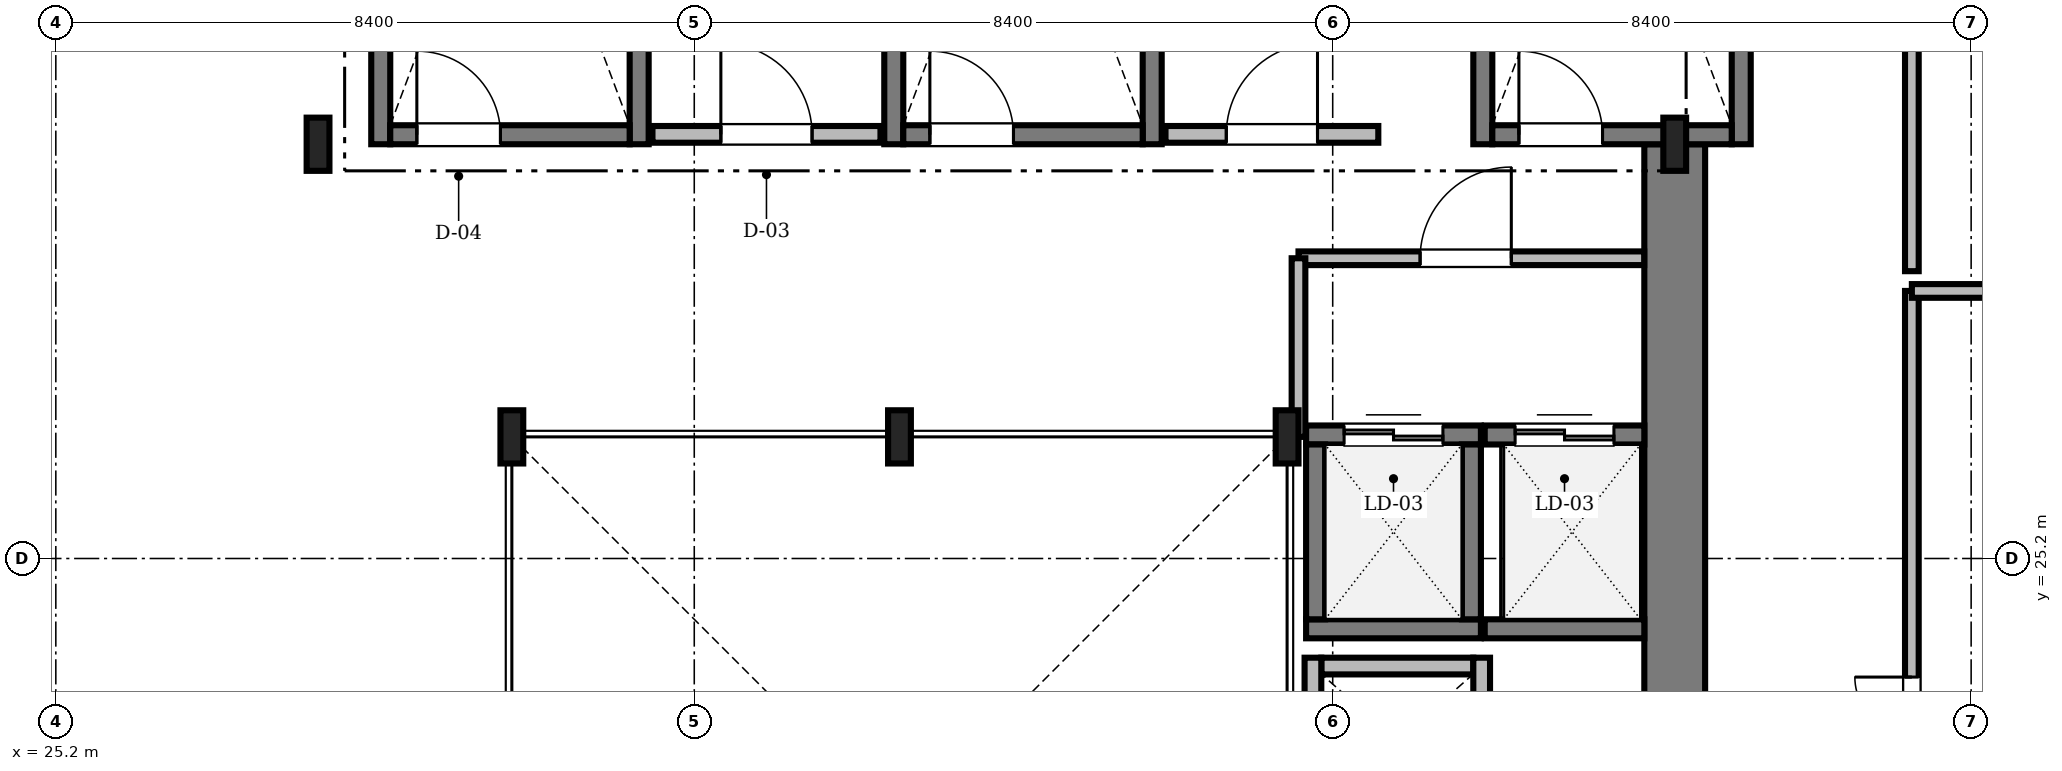
"""IFC4 building model, lengths in metres.
Left out: names, types, materials, properties, quantities, classifications, styles, units other than length and angle.
Written with IfcOpenShell. Run it as: python <this file> out.ifc"""

import sys

from ifc_helpers import new_model, si_unit, direction, frame, frame_2d, origin, origin_2d, place, context, subcontext, project, spatial, rectangle, i_section, extrude, source, transform, mapped, element, fill, save


model = new_model("IFC4")
c1 = context("Model", 3, precision=1e-05, world=origin(), true_north=direction((0.0, 1.0)))
c2 = subcontext(c1, "Body", "Model", "MODEL_VIEW")
j1 = project(units=[si_unit("LENGTHUNIT", "METRE"), si_unit("PLANEANGLEUNIT", "RADIAN")], contexts=[c1])
p1 = place(None, origin())
s1 = spatial("IfcSite", under=j1, at=p1, CompositionType="ELEMENT")
p2 = place(p1, origin())
s2 = spatial("IfcBuilding", under=s1, at=p2, CompositionType="ELEMENT")
p3 = place(p2, frame((0.0, 0.0, 237.3)))
s3 = spatial("IfcBuildingStorey", under=s2, at=p3, CompositionType="ELEMENT", Elevation=237.3)
m1 = source(origin(), c2, "Body", "SweptSolid", [
    extrude(rectangle(XDim=13.15, YDim=0.8, at=frame_2d((6.575, 0.0))), origin(), (0.0, 0.0, 1.0), 4.75),
])
p4 = place(p3, frame((46.5, 17.5, 0.0), z_axis=(0.0, 0.0, 1.0), x_axis=(0.0, 1.0, 0.0)))
e1 = element("IfcWall", 1, at=p4, inside=s3, PredefinedType="SHEAR", context=c2, shape_type="MappedRepresentation", body=[
    mapped(m1, transform((0.0, 0.0, 0.0), scale=1.0)),
])
m2 = source(origin(), c2, "Body", "SweptSolid", [
    extrude(i_section(OverallWidth=0.3, OverallDepth=0.7, WebThickness=0.017, FlangeThickness=0.032, FilletRadius=0.027, at=origin_2d()), origin(), (0.0, 0.0, 1.0), 4.75),
])
for number, where, z_axis, x_axis in (
    (2, (41.4, 26.8, 0.0), (0.0, 0.0, 1.0), (1.0, 0.0, 0.0)),
    (3, (36.3, 26.8, 0.0), (0.0, 0.0, 1.0), (1.0, 0.0, 0.0)),
    (4, (31.2, 26.8, 0.0), (0.0, 0.0, 1.0), (1.0, 0.0, 0.0)),
    (5, (28.65, 30.65, 0.0), (0.0, 0.0, 1.0), (1.0, 0.0, 0.0)),
    (6, (46.5, 30.65, 0.0), (0.0, 0.0, 1.0), (1.0, 0.0, 0.0)),
):
    element("IfcColumn", number, at=place(p3, frame(where, z_axis=z_axis, x_axis=x_axis)), inside=s3, PredefinedType="COLUMN", context=c2, shape_type="MappedRepresentation", body=[
        mapped(m2, transform((0.0, 0.0, 0.0), scale=1.0)),
    ])
m3 = source(origin(), c2, "Body", "SweptSolid", [
    extrude(rectangle(XDim=9.25, YDim=0.25, at=frame_2d((4.625, 0.0))), origin(), (0.0, 0.0, 1.0), 5.2),
])
for number, where, z_axis, x_axis in (
    (7, (29.475, 30.65, 0.0), (0.0, 0.0, 1.0), (0.0, 1.0, 0.0)),
    (8, (32.875, 30.65, 0.0), (0.0, 0.0, 1.0), (0.0, 1.0, 0.0)),
):
    element("IfcWall", number, at=place(p3, frame(where, z_axis=z_axis, x_axis=x_axis)), inside=s3, PredefinedType="SOLIDWALL", context=c2, shape_type="MappedRepresentation", body=[
        mapped(m3, transform((0.0, 0.0, 0.0), scale=1.0)),
    ])
m4 = source(origin(), c2, "Body", "SweptSolid", [
    extrude(rectangle(XDim=3.15, YDim=0.25, at=frame_2d((1.575, 0.0))), origin(), (0.0, 0.0, 1.0), 5.2),
])
p5 = place(p3, frame((29.6, 30.775, 0.0), z_axis=(0.0, 0.0, 1.0), x_axis=(1.0, 0.0, 0.0)))
e9 = element("IfcWall", 9, at=p5, inside=s3, PredefinedType="SOLIDWALL", context=c2, shape_type="MappedRepresentation", body=[
    mapped(m4, transform((0.0, 0.0, 0.0), scale=1.0)),
])
m5 = source(origin(), c2, "Body", "SweptSolid", [
    extrude(rectangle(XDim=1.1, YDim=2.2, at=frame_2d((0.55, 1.1))), frame((0.0, 0.135, 0.0), z_axis=(0.0, -1.0, 0.0), x_axis=(1.0, 0.0, 0.0)), (0.0, 0.0, 1.0), 0.27),
])
p6 = place(p5, frame((0.35, 0.0, 0.0)))
e10 = element("IfcOpeningElement", 10, at=p6, cuts=e9, PredefinedType="OPENING", context=c2, shape_type="MappedRepresentation", body=[
    mapped(m5, transform((0.0, 0.0, 0.0), scale=1.0)),
])
for number, where, z_axis, x_axis in (
    (11, (36.225, 30.65, 0.0), (0.0, 0.0, 1.0), (0.0, 1.0, 0.0)),
    (12, (39.625, 30.65, 0.0), (0.0, 0.0, 1.0), (0.0, 1.0, 0.0)),
):
    element("IfcWall", number, at=place(p3, frame(where, z_axis=z_axis, x_axis=x_axis)), inside=s3, PredefinedType="SOLIDWALL", context=c2, shape_type="MappedRepresentation", body=[
        mapped(m3, transform((0.0, 0.0, 0.0), scale=1.0)),
    ])
p7 = place(p3, frame((36.35, 30.775, 0.0), z_axis=(0.0, 0.0, 1.0), x_axis=(1.0, 0.0, 0.0)))
e13 = element("IfcWall", 13, at=p7, inside=s3, PredefinedType="SOLIDWALL", context=c2, shape_type="MappedRepresentation", body=[
    mapped(m4, transform((0.0, 0.0, 0.0), scale=1.0)),
])
p8 = place(p7, frame((0.35, 0.0, 0.0)))
e14 = element("IfcOpeningElement", 14, at=p8, cuts=e13, PredefinedType="OPENING", context=c2, shape_type="MappedRepresentation", body=[
    mapped(m5, transform((0.0, 0.0, 0.0), scale=1.0)),
])
for number, where, z_axis, x_axis in (
    (15, (43.975, 30.65, 0.0), (0.0, 0.0, 1.0), (0.0, 1.0, 0.0)),
    (16, (47.375, 30.65, 0.0), (0.0, 0.0, 1.0), (0.0, 1.0, 0.0)),
):
    element("IfcWall", number, at=place(p3, frame(where, z_axis=z_axis, x_axis=x_axis)), inside=s3, PredefinedType="SOLIDWALL", context=c2, shape_type="MappedRepresentation", body=[
        mapped(m3, transform((0.0, 0.0, 0.0), scale=1.0)),
    ])
p9 = place(p3, frame((44.1, 30.775, 0.0), z_axis=(0.0, 0.0, 1.0), x_axis=(1.0, 0.0, 0.0)))
e17 = element("IfcWall", 17, at=p9, inside=s3, PredefinedType="SOLIDWALL", context=c2, shape_type="MappedRepresentation", body=[
    mapped(m4, transform((0.0, 0.0, 0.0), scale=1.0)),
])
p10 = place(p9, frame((0.35, 0.0, 0.0)))
e18 = element("IfcOpeningElement", 18, at=p10, cuts=e17, PredefinedType="OPENING", context=c2, shape_type="MappedRepresentation", body=[
    mapped(m5, transform((0.0, 0.0, 0.0), scale=1.0)),
])
m6 = source(origin(), c2, "Body", "SweptSolid", [
    extrude(rectangle(XDim=3.0, YDim=0.22, at=frame_2d((1.5, 0.0))), origin(), (0.0, 0.0, 1.0), 4.75),
])
p11 = place(p3, frame((33.05, 30.78, 0.0), z_axis=(0.0, 0.0, 1.0), x_axis=(1.0, 0.0, 0.0)))
e19 = element("IfcWall", 19, at=p11, inside=s3, PredefinedType="SOLIDWALL", context=c2, shape_type="MappedRepresentation", body=[
    mapped(m6, transform((0.0, 0.0, 0.0), scale=1.0)),
])
m7 = source(origin(), c2, "Body", "SweptSolid", [
    extrude(rectangle(XDim=1.2, YDim=2.2, at=frame_2d((0.6, 1.1))), frame((0.0, 0.12, 0.0), z_axis=(0.0, -1.0, 0.0), x_axis=(1.0, 0.0, 0.0)), (0.0, 0.0, 1.0), 0.24),
])
p12 = place(p11, frame((0.9, 0.0, 0.0)))
e20 = element("IfcOpeningElement", 20, at=p12, cuts=e19, PredefinedType="OPENING", context=c2, shape_type="MappedRepresentation", body=[
    mapped(m7, transform((0.0, 0.0, 0.0), scale=1.0)),
])
m8 = source(origin(), c2, "Body", "SweptSolid", [
    extrude(rectangle(XDim=2.8, YDim=0.22, at=frame_2d((1.4, 0.0))), origin(), (0.0, 0.0, 1.0), 4.75),
])
p13 = place(p3, frame((39.8, 30.78, 0.0), z_axis=(0.0, 0.0, 1.0), x_axis=(1.0, 0.0, 0.0)))
e21 = element("IfcWall", 21, at=p13, inside=s3, PredefinedType="SOLIDWALL", context=c2, shape_type="MappedRepresentation", body=[
    mapped(m8, transform((0.0, 0.0, 0.0), scale=1.0)),
])
p14 = place(p13, frame((0.8, 0.0, 0.0)))
e22 = element("IfcOpeningElement", 22, at=p14, cuts=e21, PredefinedType="OPENING", context=c2, shape_type="MappedRepresentation", body=[
    mapped(m7, transform((0.0, 0.0, 0.0), scale=1.0)),
])
m9 = source(origin(), c2, "Body", "SweptSolid", [
    extrude(rectangle(XDim=2.0, YDim=0.22, at=frame_2d((1.0, 0.0))), origin(), (0.0, 0.0, 1.0), 4.75),
])
p15 = place(p3, frame((41.85, 23.785, 0.0), z_axis=(0.0, 0.0, 1.0), x_axis=(1.0, 0.0, 0.0)))
e23 = element("IfcWall", 23, at=p15, inside=s3, PredefinedType="SOLIDWALL", context=c2, shape_type="MappedRepresentation", body=[
    mapped(m9, transform((0.0, 0.0, 0.0), scale=1.0)),
])
m10 = source(origin(), c2, "Body", "SweptSolid", [
    extrude(rectangle(XDim=2.19, YDim=0.22, at=frame_2d((1.095, 0.0))), origin(), (0.0, 0.0, 1.0), 4.75),
])
for number, where, z_axis, x_axis in (
    (24, (41.74, 21.705, 0.0), (0.0, 0.0, 1.0), (0.0, 1.0, 0.0)),
    (25, (43.96, 21.705, 0.0), (0.0, 0.0, 1.0), (0.0, 1.0, 0.0)),
):
    element("IfcWall", number, at=place(p3, frame(where, z_axis=z_axis, x_axis=x_axis)), inside=s3, PredefinedType="SOLIDWALL", context=c2, shape_type="MappedRepresentation", body=[
        mapped(m10, transform((0.0, 0.0, 0.0), scale=1.0)),
    ])
m11 = source(origin(), c2, "Body", "SweptSolid", [
    extrude(rectangle(XDim=2.3, YDim=0.25, at=frame_2d((1.15, 0.0))), origin(), (0.0, 0.0, 1.0), 4.75),
])
p16 = place(p3, frame((41.65, 24.275, 0.0), z_axis=(0.0, 0.0, 1.0), x_axis=(1.0, 0.0, 0.0)))
e26 = element("IfcWall", 26, at=p16, inside=s3, PredefinedType="SOLIDWALL", context=c2, shape_type="MappedRepresentation", body=[
    mapped(m11, transform((0.0, 0.0, 0.0), scale=1.0)),
])
p17 = place(p3, frame((41.65, 26.825, 0.0), z_axis=(0.0, 0.0, 1.0), x_axis=(1.0, 0.0, 0.0)))
e27 = element("IfcWall", 27, at=p17, inside=s3, PredefinedType="SOLIDWALL", context=c2, shape_type="MappedRepresentation", body=[
    mapped(m11, transform((0.0, 0.0, 0.0), scale=1.0)),
])
m12 = source(origin(), c2, "Body", "SweptSolid", [
    extrude(rectangle(XDim=1.3, YDim=2.3, at=frame_2d((0.65, 1.15))), frame((0.0, 0.135, 0.0), z_axis=(0.0, -1.0, 0.0), x_axis=(1.0, 0.0, 0.0)), (0.0, 0.0, 1.0), 0.27),
])
p18 = place(p17, frame((0.5, 0.0, 0.0)))
e28 = element("IfcOpeningElement", 28, at=p18, cuts=e27, PredefinedType="OPENING", context=c2, shape_type="MappedRepresentation", body=[
    mapped(m12, transform((0.0, 0.0, 0.0), scale=1.0)),
])
for number, where, z_axis, x_axis in (
    (29, (41.775, 24.4, 0.0), (0.0, 0.0, 1.0), (0.0, 1.0, 0.0)),
    (30, (43.825, 24.4, 0.0), (0.0, 0.0, 1.0), (0.0, 1.0, 0.0)),
):
    element("IfcWall", number, at=place(p3, frame(where, z_axis=z_axis, x_axis=x_axis)), inside=s3, PredefinedType="SOLIDWALL", context=c2, shape_type="MappedRepresentation", body=[
        mapped(m11, transform((0.0, 0.0, 0.0), scale=1.0)),
    ])
m13 = source(origin(), c2, "Body", "SweptSolid", [
    extrude(rectangle(XDim=2.1, YDim=0.25, at=frame_2d((1.05, 0.0))), origin(), (0.0, 0.0, 1.0), 4.75),
])
p19 = place(p3, frame((44.0, 24.275, 0.0), z_axis=(0.0, 0.0, 1.0), x_axis=(1.0, 0.0, 0.0)))
e31 = element("IfcWall", 31, at=p19, inside=s3, PredefinedType="SOLIDWALL", context=c2, shape_type="MappedRepresentation", body=[
    mapped(m13, transform((0.0, 0.0, 0.0), scale=1.0)),
])
p20 = place(p3, frame((44.0, 26.825, 0.0), z_axis=(0.0, 0.0, 1.0), x_axis=(1.0, 0.0, 0.0)))
e32 = element("IfcWall", 32, at=p20, inside=s3, PredefinedType="SOLIDWALL", context=c2, shape_type="MappedRepresentation", body=[
    mapped(m13, transform((0.0, 0.0, 0.0), scale=1.0)),
])
p21 = place(p20, frame((0.4, 0.0, 0.0)))
e33 = element("IfcOpeningElement", 33, at=p21, cuts=e32, PredefinedType="OPENING", context=c2, shape_type="MappedRepresentation", body=[
    mapped(m12, transform((0.0, 0.0, 0.0), scale=1.0)),
])
m14 = source(origin(), c2, "Body", "SweptSolid", [
    extrude(rectangle(XDim=9.88, YDim=0.18, at=frame_2d((4.94, 0.0))), origin(), (0.0, 0.0, 1.0), 4.75),
])
p22 = place(p3, frame((49.62, 28.98, 0.0), z_axis=(0.0, 0.0, 1.0), x_axis=(0.0, 1.0, 0.0)))
e34 = element("IfcWall", 34, at=p22, inside=s3, PredefinedType="PARTITIONING", context=c2, shape_type="MappedRepresentation", body=[
    mapped(m14, transform((0.0, 0.0, 0.0), scale=1.0)),
])
m15 = source(origin(), c2, "Body", "SweptSolid", [
    extrude(rectangle(XDim=1.5, YDim=2.3, at=frame_2d((0.75, 1.15))), frame((0.0, 0.1, 0.0), z_axis=(0.0, -1.0, 0.0), x_axis=(1.0, 0.0, 0.0)), (0.0, 0.0, 1.0), 0.2),
])
p23 = place(p22, frame((3.2, 0.0, 0.0)))
e35 = element("IfcOpeningElement", 35, at=p23, cuts=e34, PredefinedType="OPENING", context=c2, shape_type="MappedRepresentation", body=[
    mapped(m15, transform((0.0, 0.0, 0.0), scale=1.0)),
])
m16 = source(origin(), c2, "Body", "SweptSolid", [
    extrude(rectangle(XDim=9.78, YDim=0.18, at=frame_2d((4.89, 0.0))), origin(), (0.0, 0.0, 1.0), 4.442),
])
p24 = place(p3, frame((49.62, 18.94, 0.0), z_axis=(0.0, 0.0, 1.0), x_axis=(0.0, 1.0, 0.0)))
e36 = element("IfcWall", 36, at=p24, inside=s3, PredefinedType="PARTITIONING", context=c2, shape_type="MappedRepresentation", body=[
    mapped(m16, transform((0.0, 0.0, 0.0), scale=1.0)),
])
p25 = place(p24, frame((3.2, 0.0, 0.0)))
e37 = element("IfcOpeningElement", 37, at=p25, cuts=e36, PredefinedType="OPENING", context=c2, shape_type="MappedRepresentation", body=[
    mapped(m15, transform((0.0, 0.0, 0.0), scale=1.0)),
])
m17 = source(origin(), c2, "Body", "SweptSolid", [
    extrude(rectangle(XDim=4.548, YDim=0.18, at=frame_2d((2.274, 0.0))), origin(), (0.0, 0.0, 1.0), 4.382),
])
p26 = place(p3, frame((41.55, 29.15, 0.0), z_axis=(0.0, 0.0, 1.0), x_axis=(1.0, 0.0, 0.0)))
e38 = element("IfcWall", 38, at=p26, inside=s3, PredefinedType="PARTITIONING", context=c2, shape_type="MappedRepresentation", body=[
    mapped(m17, transform((0.0, 0.0, 0.0), scale=1.0)),
])
m18 = source(origin(), c2, "Body", "SweptSolid", [
    extrude(rectangle(XDim=1.2, YDim=2.2, at=frame_2d((0.6, 1.1))), frame((0.0, 0.1, 0.0), z_axis=(0.0, -1.0, 0.0), x_axis=(1.0, 0.0, 0.0)), (0.0, 0.0, 1.0), 0.2),
])
p27 = place(p26, frame((1.6, 0.0, 0.0)))
e39 = element("IfcOpeningElement", 39, at=p27, cuts=e38, PredefinedType="OPENING", context=c2, shape_type="MappedRepresentation", body=[
    mapped(m18, transform((0.0, 0.0, 0.0), scale=1.0)),
])
m19 = source(origin(), c2, "Body", "SweptSolid", [
    extrude(rectangle(XDim=5.69, YDim=0.18, at=frame_2d((2.845, 0.0))), origin(), (0.0, 0.0, 1.0), 4.75),
])
p28 = place(p3, frame((49.62, 28.72, 0.0), z_axis=(0.0, 0.0, 1.0), x_axis=(1.0, 0.0, 0.0)))
e40 = element("IfcWall", 40, at=p28, inside=s3, PredefinedType="PARTITIONING", context=c2, shape_type="MappedRepresentation", body=[
    mapped(m19, transform((0.0, 0.0, 0.0), scale=1.0)),
])
m20 = source(origin(), c2, "Body", "SweptSolid", [
    extrude(rectangle(XDim=2.35, YDim=0.18, at=frame_2d((1.175, 0.0))), origin(), (0.0, 0.0, 1.0), 4.382),
])
p29 = place(p3, frame((41.55, 26.8, 0.0), z_axis=(0.0, 0.0, 1.0), x_axis=(0.0, 1.0, 0.0)))
e41 = element("IfcWall", 41, at=p29, inside=s3, PredefinedType="PARTITIONING", context=c2, shape_type="MappedRepresentation", body=[
    mapped(m20, transform((0.0, 0.0, 0.0), scale=1.0)),
])
m21 = source(origin(), c2, "Body", "SweptSolid", [
    extrude(rectangle(XDim=1.1, YDim=2.2, at=frame_2d((0.55, 1.1))), frame((0.0, 0.025, 0.0), z_axis=(0.0, -1.0, 0.0), x_axis=(1.0, 0.0, 0.0)), (0.0, 0.0, 1.0), 0.05),
])
p30 = place(p6, origin())
e42 = element("IfcDoor", 42, at=p30, inside=s3, OperationType="SINGLE_SWING_LEFT", PredefinedType="DOOR", context=c2, shape_type="MappedRepresentation", body=[
    mapped(m21, transform((0.0, 0.0, 0.0), scale=1.0)),
])
fill(e10, e42)
p31 = place(p8, origin())
e43 = element("IfcDoor", 43, at=p31, inside=s3, OperationType="SINGLE_SWING_LEFT", PredefinedType="DOOR", context=c2, shape_type="MappedRepresentation", body=[
    mapped(m21, transform((0.0, 0.0, 0.0), scale=1.0)),
])
fill(e14, e43)
p32 = place(p10, origin())
e44 = element("IfcDoor", 44, at=p32, inside=s3, OperationType="SINGLE_SWING_LEFT", PredefinedType="DOOR", context=c2, shape_type="MappedRepresentation", body=[
    mapped(m21, transform((0.0, 0.0, 0.0), scale=1.0)),
])
fill(e18, e44)
m22 = source(origin(), c2, "Body", "SweptSolid", [
    extrude(rectangle(XDim=1.2, YDim=2.2, at=frame_2d((0.6, 1.1))), frame((0.0, 0.025, 0.0), z_axis=(0.0, -1.0, 0.0), x_axis=(1.0, 0.0, 0.0)), (0.0, 0.0, 1.0), 0.05),
])
p33 = place(p12, origin())
e45 = element("IfcDoor", 45, at=p33, inside=s3, OperationType="SINGLE_SWING_LEFT", PredefinedType="DOOR", context=c2, shape_type="MappedRepresentation", body=[
    mapped(m22, transform((0.0, 0.0, 0.0), scale=1.0)),
])
fill(e20, e45)
p34 = place(p14, origin())
e46 = element("IfcDoor", 46, at=p34, inside=s3, OperationType="SINGLE_SWING_RIGHT", PredefinedType="DOOR", context=c2, shape_type="MappedRepresentation", body=[
    mapped(m22, transform((0.0, 0.0, 0.0), scale=1.0)),
])
fill(e22, e46)
m23 = source(origin(), c2, "Body", "SweptSolid", [
    extrude(rectangle(XDim=1.3, YDim=2.3, at=frame_2d((0.65, 1.15))), frame((0.0, 0.025, 0.0), z_axis=(0.0, -1.0, 0.0), x_axis=(1.0, 0.0, 0.0)), (0.0, 0.0, 1.0), 0.05),
])
p35 = place(p18, origin())
e47 = element("IfcDoor", 47, at=p35, inside=s3, OperationType="DOUBLE_DOOR_SLIDING", PredefinedType="DOOR", context=c2, shape_type="MappedRepresentation", body=[
    mapped(m23, transform((0.0, 0.0, 0.0), scale=1.0)),
])
fill(e28, e47)
p36 = place(p21, origin())
e48 = element("IfcDoor", 48, at=p36, inside=s3, OperationType="DOUBLE_DOOR_SLIDING", PredefinedType="DOOR", context=c2, shape_type="MappedRepresentation", body=[
    mapped(m23, transform((0.0, 0.0, 0.0), scale=1.0)),
])
fill(e33, e48)
m24 = source(origin(), c2, "Body", "SweptSolid", [
    extrude(rectangle(XDim=1.5, YDim=2.3, at=frame_2d((0.75, 1.15))), frame((0.0, 0.025, 0.0), z_axis=(0.0, -1.0, 0.0), x_axis=(1.0, 0.0, 0.0)), (0.0, 0.0, 1.0), 0.05),
])
p37 = place(p25, origin())
e49 = element("IfcDoor", 49, at=p37, inside=s3, OperationType="DOUBLE_DOOR_SINGLE_SWING", PredefinedType="DOOR", context=c2, shape_type="MappedRepresentation", body=[
    mapped(m24, transform((0.0, 0.0, 0.0), scale=1.0)),
])
fill(e37, e49)
p38 = place(p27, origin())
e50 = element("IfcDoor", 50, at=p38, inside=s3, OperationType="SINGLE_SWING_RIGHT", PredefinedType="DOOR", context=c2, shape_type="MappedRepresentation", body=[
    mapped(m22, transform((0.0, 0.0, 0.0), scale=1.0)),
])
fill(e39, e50)
save(model, sys.argv[1])
